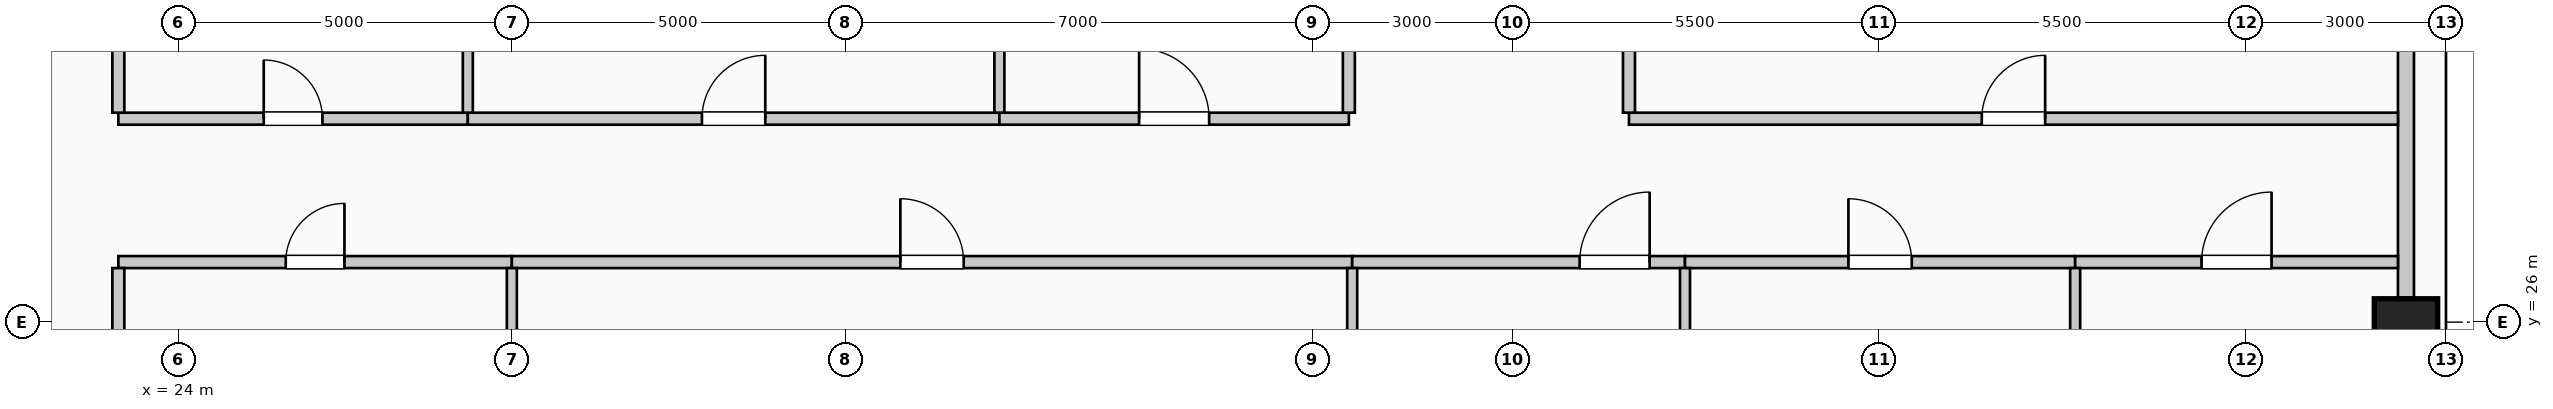
"""IFC4 building model, lengths in metres.
Left out: names, types, materials, properties, quantities, classifications, styles, units other than length and angle.
Written with IfcOpenShell. Run it as: python <this file> out.ifc"""

import sys

from ifc_helpers import new_model, si_unit, direction, frame, frame_2d, origin, origin_2d, place, context, subcontext, project, spatial, rectangle, extrude, element, fill, save


model = new_model("IFC4")
c1 = context("Model", 3, precision=1e-05, world=origin(), true_north=direction((0.0, 1.0)))
c2 = subcontext(c1, "Body", "Model", "MODEL_VIEW")
j1 = project(units=[si_unit("LENGTHUNIT", "METRE"), si_unit("PLANEANGLEUNIT", "RADIAN")], contexts=[c1])
p1 = place(None, origin())
s1 = spatial("IfcSite", under=j1, at=p1, CompositionType="ELEMENT")
p2 = place(p1, origin())
s2 = spatial("IfcBuilding", under=s1, at=p2, CompositionType="ELEMENT")
p3 = place(p2, frame((0.0, 0.0, 285.0)))
s3 = spatial("IfcBuildingStorey", under=s2, at=p3, CompositionType="ELEMENT", Elevation=285.0)
p4 = place(p3, frame((57.4, 26.0, 0.0), z_axis=(0.0, 0.0, 1.0), x_axis=(0.0, 1.0, 0.0)))
e1 = element("IfcColumn", 1, at=p4, inside=s3, PredefinedType="COLUMN", context=c2, shape_type="SweptSolid", body=[
    extrude(rectangle(XDim=0.7, YDim=0.95, at=origin_2d()), origin(), (0.0, 0.0, 1.0), 4.0),
])
p5 = place(p3, frame((57.4, 33.63, 0.0), z_axis=(0.0, 0.0, 1.0), x_axis=(0.0, -1.0, 0.0)))
e2 = element("IfcWall", 2, at=p5, inside=s3, PredefinedType="SOLIDWALL", context=c2, shape_type="SweptSolid", body=[
    extrude(rectangle(XDim=7.26, YDim=0.24, at=frame_2d((3.63, 0.0))), origin(), (0.0, 0.0, 1.0), 3.015),
])
p6 = place(p3, frame((23.1, 26.9, 0.0), z_axis=(0.0, 0.0, 1.0), x_axis=(1.0, 0.0, 0.0)))
e3 = element("IfcWall", 3, at=p6, inside=s3, PredefinedType="PARTITIONING", context=c2, shape_type="SweptSolid", body=[
    extrude(rectangle(XDim=5.9, YDim=0.18, at=frame_2d((2.95, 0.0))), origin(), (0.0, 0.0, 1.0), 3.775),
])
p7 = place(p6, frame((2.51, 0.0, 0.0)))
e4 = element("IfcOpeningElement", 4, at=p7, cuts=e3, PredefinedType="OPENING", context=c2, shape_type="SweptSolid", body=[
    extrude(rectangle(XDim=0.88, YDim=2.1, at=frame_2d((0.44, 1.05))), frame((0.0, 0.1, 0.0), z_axis=(0.0, -1.0, 0.0), x_axis=(1.0, 0.0, 0.0)), (0.0, 0.0, 1.0), 0.2),
])
p8 = place(p3, frame((29.0, 26.9, 0.0), z_axis=(0.0, 0.0, 1.0), x_axis=(1.0, 0.0, 0.0)))
e5 = element("IfcWall", 5, at=p8, inside=s3, PredefinedType="PARTITIONING", context=c2, shape_type="SweptSolid", body=[
    extrude(rectangle(XDim=12.6, YDim=0.18, at=frame_2d((6.3, 0.0))), origin(), (0.0, 0.0, 1.0), 3.775),
])
p9 = place(p8, frame((5.825, 0.0, 0.0)))
e6 = element("IfcOpeningElement", 6, at=p9, cuts=e5, PredefinedType="OPENING", context=c2, shape_type="SweptSolid", body=[
    extrude(rectangle(XDim=0.95, YDim=2.15, at=frame_2d((0.475, 1.075))), frame((0.0, 0.1, 0.0), z_axis=(0.0, -1.0, 0.0), x_axis=(1.0, 0.0, 0.0)), (0.0, 0.0, 1.0), 0.2),
])
p10 = place(p3, frame((41.6, 26.9, 0.0), z_axis=(0.0, 0.0, 1.0), x_axis=(1.0, 0.0, 0.0)))
e7 = element("IfcWall", 7, at=p10, inside=s3, PredefinedType="PARTITIONING", context=c2, shape_type="SweptSolid", body=[
    extrude(rectangle(XDim=4.99, YDim=0.18, at=frame_2d((2.495, 0.0))), origin(), (0.0, 0.0, 1.0), 3.775),
])
p11 = place(p10, frame((3.41, 0.0, 0.0)))
e8 = element("IfcOpeningElement", 8, at=p11, cuts=e7, PredefinedType="OPENING", context=c2, shape_type="SweptSolid", body=[
    extrude(rectangle(XDim=1.05, YDim=2.15, at=frame_2d((0.525, 1.075))), frame((0.0, 0.1, 0.0), z_axis=(0.0, -1.0, 0.0), x_axis=(1.0, 0.0, 0.0)), (0.0, 0.0, 1.0), 0.2),
])
p12 = place(p3, frame((46.59, 26.9, 0.0), z_axis=(0.0, 0.0, 1.0), x_axis=(1.0, 0.0, 0.0)))
e9 = element("IfcWall", 9, at=p12, inside=s3, PredefinedType="PARTITIONING", context=c2, shape_type="SweptSolid", body=[
    extrude(rectangle(XDim=5.85, YDim=0.18, at=frame_2d((2.925, 0.0))), origin(), (0.0, 0.0, 1.0), 3.775),
])
p13 = place(p12, frame((2.45, 0.0, 0.0)))
e10 = element("IfcOpeningElement", 10, at=p13, cuts=e9, PredefinedType="OPENING", context=c2, shape_type="SweptSolid", body=[
    extrude(rectangle(XDim=0.95, YDim=2.15, at=frame_2d((0.475, 1.075))), frame((0.0, 0.1, 0.0), z_axis=(0.0, -1.0, 0.0), x_axis=(1.0, 0.0, 0.0)), (0.0, 0.0, 1.0), 0.2),
])
p14 = place(p3, frame((52.44, 26.9, 0.0), z_axis=(0.0, 0.0, 1.0), x_axis=(1.0, 0.0, 0.0)))
e11 = element("IfcWall", 11, at=p14, inside=s3, PredefinedType="PARTITIONING", context=c2, shape_type="SweptSolid", body=[
    extrude(rectangle(XDim=4.84, YDim=0.18, at=frame_2d((2.42, 0.0))), origin(), (0.0, 0.0, 1.0), 3.775),
])
p15 = place(p14, frame((1.895, 0.0, 0.0)))
e12 = element("IfcOpeningElement", 12, at=p15, cuts=e11, PredefinedType="OPENING", context=c2, shape_type="SweptSolid", body=[
    extrude(rectangle(XDim=1.05, YDim=2.15, at=frame_2d((0.525, 1.075))), frame((0.0, 0.1, 0.0), z_axis=(0.0, -1.0, 0.0), x_axis=(1.0, 0.0, 0.0)), (0.0, 0.0, 1.0), 0.2),
])
p16 = place(p3, frame((23.1, 29.05, 0.0), z_axis=(0.0, 0.0, 1.0), x_axis=(1.0, 0.0, 0.0)))
e13 = element("IfcWall", 13, at=p16, inside=s3, PredefinedType="PARTITIONING", context=c2, shape_type="SweptSolid", body=[
    extrude(rectangle(XDim=5.24, YDim=0.18, at=frame_2d((2.62, 0.0))), origin(), (0.0, 0.0, 1.0), 3.775),
])
p17 = place(p16, frame((2.18, 0.0, 0.0)))
e14 = element("IfcOpeningElement", 14, at=p17, cuts=e13, PredefinedType="OPENING", context=c2, shape_type="SweptSolid", body=[
    extrude(rectangle(XDim=0.88, YDim=2.1, at=frame_2d((0.44, 1.05))), frame((0.0, 0.1, 0.0), z_axis=(0.0, -1.0, 0.0), x_axis=(1.0, 0.0, 0.0)), (0.0, 0.0, 1.0), 0.2),
])
p18 = place(p3, frame((28.34, 29.05, 0.0), z_axis=(0.0, 0.0, 1.0), x_axis=(1.0, 0.0, 0.0)))
e15 = element("IfcWall", 15, at=p18, inside=s3, PredefinedType="PARTITIONING", context=c2, shape_type="SweptSolid", body=[
    extrude(rectangle(XDim=7.97, YDim=0.18, at=frame_2d((3.985, 0.0))), origin(), (0.0, 0.0, 1.0), 3.775),
])
p19 = place(p18, frame((3.51, 0.0, 0.0)))
e16 = element("IfcOpeningElement", 16, at=p19, cuts=e15, PredefinedType="OPENING", context=c2, shape_type="SweptSolid", body=[
    extrude(rectangle(XDim=0.95, YDim=2.15, at=frame_2d((0.475, 1.075))), frame((0.0, 0.1, 0.0), z_axis=(0.0, -1.0, 0.0), x_axis=(1.0, 0.0, 0.0)), (0.0, 0.0, 1.0), 0.2),
])
p20 = place(p3, frame((36.31, 29.05, 0.0), z_axis=(0.0, 0.0, 1.0), x_axis=(1.0, 0.0, 0.0)))
e17 = element("IfcWall", 17, at=p20, inside=s3, PredefinedType="PARTITIONING", context=c2, shape_type="SweptSolid", body=[
    extrude(rectangle(XDim=5.24, YDim=0.18, at=frame_2d((2.62, 0.0))), origin(), (0.0, 0.0, 1.0), 3.775),
])
p21 = place(p20, frame((2.095, 0.0, 0.0)))
e18 = element("IfcOpeningElement", 18, at=p21, cuts=e17, PredefinedType="OPENING", context=c2, shape_type="SweptSolid", body=[
    extrude(rectangle(XDim=1.05, YDim=2.15, at=frame_2d((0.525, 1.075))), frame((0.0, 0.1, 0.0), z_axis=(0.0, -1.0, 0.0), x_axis=(1.0, 0.0, 0.0)), (0.0, 0.0, 1.0), 0.2),
])
p22 = place(p3, frame((45.75, 29.05, 0.0), z_axis=(0.0, 0.0, 1.0), x_axis=(1.0, 0.0, 0.0)))
e19 = element("IfcWall", 19, at=p22, inside=s3, PredefinedType="PARTITIONING", context=c2, shape_type="SweptSolid", body=[
    extrude(rectangle(XDim=11.53, YDim=0.18, at=frame_2d((5.765, 0.0))), origin(), (0.0, 0.0, 1.0), 3.775),
])
p23 = place(p22, frame((5.29, 0.0, 0.0)))
e20 = element("IfcOpeningElement", 20, at=p23, cuts=e19, PredefinedType="OPENING", context=c2, shape_type="SweptSolid", body=[
    extrude(rectangle(XDim=0.95, YDim=2.15, at=frame_2d((0.475, 1.075))), frame((0.0, 0.1, 0.0), z_axis=(0.0, -1.0, 0.0), x_axis=(1.0, 0.0, 0.0)), (0.0, 0.0, 1.0), 0.2),
])
p24 = place(p3, frame((23.1, 17.3, 0.0), z_axis=(0.0, 0.0, 1.0), x_axis=(0.0, 1.0, 0.0)))
e21 = element("IfcWall", 21, at=p24, inside=s3, PredefinedType="PARTITIONING", context=c2, shape_type="SweptSolid", body=[
    extrude(rectangle(XDim=9.51, YDim=0.18, at=frame_2d((4.755, 0.0))), origin(), (0.0, 0.0, 1.0), 3.775),
])
p25 = place(p3, frame((23.1, 29.14, 0.0), z_axis=(0.0, 0.0, 1.0), x_axis=(0.0, 1.0, 0.0)))
e22 = element("IfcWall", 22, at=p25, inside=s3, PredefinedType="PARTITIONING", context=c2, shape_type="SweptSolid", body=[
    extrude(rectangle(XDim=3.12, YDim=0.18, at=frame_2d((1.56, 0.0))), origin(), (0.0, 0.0, 1.0), 3.775),
])
p26 = place(p3, frame((28.34, 29.14, 0.0), z_axis=(0.0, 0.0, 1.0), x_axis=(0.0, 1.0, 0.0)))
e23 = element("IfcWall", 23, at=p26, inside=s3, PredefinedType="PARTITIONING", context=c2, shape_type="SweptSolid", body=[
    extrude(rectangle(XDim=16.26, YDim=0.15, at=frame_2d((8.13, 0.0))), origin(), (0.0, 0.0, 1.0), 3.775),
])
p27 = place(p3, frame((29.0, 18.425, 0.0), z_axis=(0.0, 0.0, 1.0), x_axis=(0.0, 1.0, 0.0)))
e24 = element("IfcWall", 24, at=p27, inside=s3, PredefinedType="PARTITIONING", context=c2, shape_type="SweptSolid", body=[
    extrude(rectangle(XDim=8.385, YDim=0.15, at=frame_2d((4.192, 0.0))), origin(), (0.0, 0.0, 1.0), 3.22),
])
p28 = place(p3, frame((36.31, 29.14, 0.0), z_axis=(0.0, 0.0, 1.0), x_axis=(0.0, 1.0, 0.0)))
e25 = element("IfcWall", 25, at=p28, inside=s3, PredefinedType="PARTITIONING", context=c2, shape_type="SweptSolid", body=[
    extrude(rectangle(XDim=16.14, YDim=0.15, at=frame_2d((8.07, 0.0))), origin(), (0.0, 0.0, 1.0), 3.775),
])
p29 = place(p3, frame((41.55, 29.14, 0.0), z_axis=(0.0, 0.0, 1.0), x_axis=(0.0, 1.0, 0.0)))
e26 = element("IfcWall", 26, at=p29, inside=s3, PredefinedType="PARTITIONING", context=c2, shape_type="SweptSolid", body=[
    extrude(rectangle(XDim=3.21, YDim=0.18, at=frame_2d((1.605, 0.0))), origin(), (0.0, 0.0, 1.0), 3.22),
])
p30 = place(p3, frame((41.6, 18.425, 0.0), z_axis=(0.0, 0.0, 1.0), x_axis=(0.0, 1.0, 0.0)))
e27 = element("IfcWall", 27, at=p30, inside=s3, PredefinedType="PARTITIONING", context=c2, shape_type="SweptSolid", body=[
    extrude(rectangle(XDim=8.385, YDim=0.15, at=frame_2d((4.192, 0.0))), origin(), (0.0, 0.0, 1.0), 3.22),
])
p31 = place(p3, frame((45.75, 29.14, 0.0), z_axis=(0.0, 0.0, 1.0), x_axis=(0.0, 1.0, 0.0)))
e28 = element("IfcWall", 28, at=p31, inside=s3, PredefinedType="PARTITIONING", context=c2, shape_type="SweptSolid", body=[
    extrude(rectangle(XDim=3.135, YDim=0.18, at=frame_2d((1.567, 0.0))), origin(), (0.0, 0.0, 1.0), 3.775),
])
for number, where, z_axis, x_axis in (
    (29, (46.59, 0.72, 0.0), (0.0, 0.0, 1.0), (0.0, 1.0, 0.0)),
    (30, (52.44, 0.72, 0.0), (0.0, 0.0, 1.0), (0.0, 1.0, 0.0)),
):
    element("IfcWall", number, at=place(p3, frame(where, z_axis=z_axis, x_axis=x_axis)), inside=s3, PredefinedType="PARTITIONING", context=c2, shape_type="SweptSolid", body=[
        extrude(rectangle(XDim=26.09, YDim=0.15, at=frame_2d((13.045, 0.0))), origin(), (0.0, 0.0, 1.0), 3.775),
    ])
p32 = place(p7, origin())
e31 = element("IfcDoor", 31, at=p32, inside=s3, OperationType="SINGLE_SWING_RIGHT", PredefinedType="DOOR", context=c2, shape_type="SweptSolid", body=[
    extrude(rectangle(XDim=0.88, YDim=2.1, at=frame_2d((0.44, 1.05))), frame((0.0, 0.025, 0.0), z_axis=(0.0, -1.0, 0.0), x_axis=(1.0, 0.0, 0.0)), (0.0, 0.0, 1.0), 0.05),
])
fill(e4, e31)
p33 = place(p9, origin())
e32 = element("IfcDoor", 32, at=p33, inside=s3, OperationType="SINGLE_SWING_LEFT", PredefinedType="DOOR", context=c2, shape_type="SweptSolid", body=[
    extrude(rectangle(XDim=0.95, YDim=2.15, at=frame_2d((0.475, 1.075))), frame((0.0, 0.025, 0.0), z_axis=(0.0, -1.0, 0.0), x_axis=(1.0, 0.0, 0.0)), (0.0, 0.0, 1.0), 0.05),
])
fill(e6, e32)
p34 = place(p11, origin())
e33 = element("IfcDoor", 33, at=p34, inside=s3, OperationType="SINGLE_SWING_RIGHT", PredefinedType="DOOR", context=c2, shape_type="SweptSolid", body=[
    extrude(rectangle(XDim=1.05, YDim=2.15, at=frame_2d((0.525, 1.075))), frame((0.0, 0.025, 0.0), z_axis=(0.0, -1.0, 0.0), x_axis=(1.0, 0.0, 0.0)), (0.0, 0.0, 1.0), 0.05),
])
fill(e8, e33)
p35 = place(p13, origin())
e34 = element("IfcDoor", 34, at=p35, inside=s3, OperationType="SINGLE_SWING_LEFT", PredefinedType="DOOR", context=c2, shape_type="SweptSolid", body=[
    extrude(rectangle(XDim=0.95, YDim=2.15, at=frame_2d((0.475, 1.075))), frame((0.0, 0.025, 0.0), z_axis=(0.0, -1.0, 0.0), x_axis=(1.0, 0.0, 0.0)), (0.0, 0.0, 1.0), 0.05),
])
fill(e10, e34)
p36 = place(p15, origin())
e35 = element("IfcDoor", 35, at=p36, inside=s3, OperationType="SINGLE_SWING_RIGHT", PredefinedType="DOOR", context=c2, shape_type="SweptSolid", body=[
    extrude(rectangle(XDim=1.05, YDim=2.15, at=frame_2d((0.525, 1.075))), frame((0.0, 0.025, 0.0), z_axis=(0.0, -1.0, 0.0), x_axis=(1.0, 0.0, 0.0)), (0.0, 0.0, 1.0), 0.05),
])
fill(e12, e35)
p37 = place(p17, origin())
e36 = element("IfcDoor", 36, at=p37, inside=s3, OperationType="SINGLE_SWING_LEFT", PredefinedType="DOOR", context=c2, shape_type="SweptSolid", body=[
    extrude(rectangle(XDim=0.88, YDim=2.1, at=frame_2d((0.44, 1.05))), frame((0.0, 0.025, 0.0), z_axis=(0.0, -1.0, 0.0), x_axis=(1.0, 0.0, 0.0)), (0.0, 0.0, 1.0), 0.05),
])
fill(e14, e36)
p38 = place(p19, origin())
e37 = element("IfcDoor", 37, at=p38, inside=s3, OperationType="SINGLE_SWING_RIGHT", PredefinedType="DOOR", context=c2, shape_type="SweptSolid", body=[
    extrude(rectangle(XDim=0.95, YDim=2.15, at=frame_2d((0.475, 1.075))), frame((0.0, 0.025, 0.0), z_axis=(0.0, -1.0, 0.0), x_axis=(1.0, 0.0, 0.0)), (0.0, 0.0, 1.0), 0.05),
])
fill(e16, e37)
p39 = place(p21, origin())
e38 = element("IfcDoor", 38, at=p39, inside=s3, OperationType="SINGLE_SWING_LEFT", PredefinedType="DOOR", context=c2, shape_type="SweptSolid", body=[
    extrude(rectangle(XDim=1.05, YDim=2.15, at=frame_2d((0.525, 1.075))), frame((0.0, 0.025, 0.0), z_axis=(0.0, -1.0, 0.0), x_axis=(1.0, 0.0, 0.0)), (0.0, 0.0, 1.0), 0.05),
])
fill(e18, e38)
p40 = place(p23, origin())
e39 = element("IfcDoor", 39, at=p40, inside=s3, OperationType="SINGLE_SWING_RIGHT", PredefinedType="DOOR", context=c2, shape_type="SweptSolid", body=[
    extrude(rectangle(XDim=0.95, YDim=2.15, at=frame_2d((0.475, 1.075))), frame((0.0, 0.025, 0.0), z_axis=(0.0, -1.0, 0.0), x_axis=(1.0, 0.0, 0.0)), (0.0, 0.0, 1.0), 0.05),
])
fill(e20, e39)
save(model, sys.argv[1])
